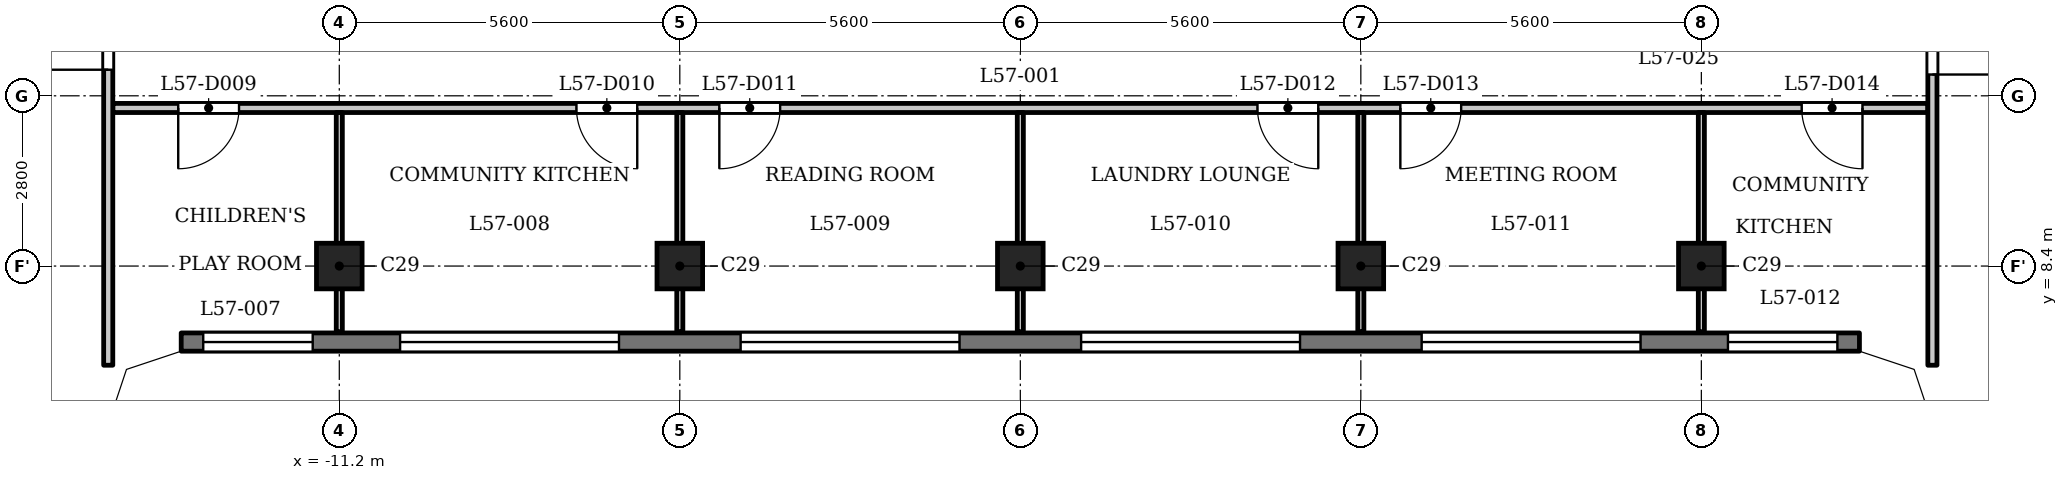
"""IFC4 building model, lengths in metres.
Left out: names, types, materials, properties, quantities, classifications, styles, units other than length and angle.
Written with IfcOpenShell. Run it as: python <this file> out.ifc"""

import sys

from ifc_helpers import new_model, si_unit, direction, frame, frame_2d, origin, origin_2d, place, context, subcontext, project, spatial, polyline, rectangle, outline, extrude, element, fill, save


model = new_model("IFC4")
c1 = context("Model", 3, precision=1e-05, world=origin(), true_north=direction((0.0, 1.0)))
c2 = subcontext(c1, "Body", "Model", "MODEL_VIEW")
j1 = project(units=[si_unit("LENGTHUNIT", "METRE"), si_unit("PLANEANGLEUNIT", "RADIAN")], contexts=[c1])
p1 = place(None, origin())
s1 = spatial("IfcSite", under=j1, at=p1, CompositionType="ELEMENT")
p2 = place(p1, origin())
s2 = spatial("IfcBuilding", under=s1, at=p2, CompositionType="ELEMENT")
p3 = place(p2, frame((0.0, 0.0, 220.4)))
s3 = spatial("IfcBuildingStorey", under=s2, at=p3, CompositionType="ELEMENT", Elevation=220.4)
for number, where, z_axis, x_axis in (
    (1, (-11.2, 8.4, 0.0), (0.0, 0.0, 1.0), (1.0, 0.0, 0.0)),
    (2, (-5.6, 8.4, 0.0), (0.0, 0.0, 1.0), (1.0, 0.0, 0.0)),
    (3, (0.0, 8.4, 0.0), (0.0, 0.0, 1.0), (1.0, 0.0, 0.0)),
    (4, (5.6, 8.4, 0.0), (0.0, 0.0, 1.0), (1.0, 0.0, 0.0)),
    (5, (11.2, 8.4, 0.0), (0.0, 0.0, 1.0), (1.0, 0.0, 0.0)),
):
    element("IfcColumn", number, at=place(p3, frame(where, z_axis=z_axis, x_axis=x_axis)), inside=s3, PredefinedType="COLUMN", context=c2, shape_type="SweptSolid", body=[
        extrude(rectangle(XDim=0.75, YDim=0.75, at=origin_2d()), origin(), (0.0, 0.0, 1.0), 3.5),
    ])
p4 = place(p3, frame((-13.8, 7.15, 0.0), z_axis=(0.0, 0.0, 1.0), x_axis=(1.0, 0.0, 0.0)))
e6 = element("IfcWall", 6, at=p4, inside=s3, PredefinedType="SOLIDWALL", context=c2, shape_type="SweptSolid", body=[
    extrude(rectangle(XDim=27.6, YDim=0.3, at=frame_2d((13.8, 0.0))), origin(), (0.0, 0.0, 1.0), 3.2),
])
p5 = place(p4, frame((0.363, 0.0, 0.9)))
e7 = element("IfcOpeningElement", 7, at=p5, cuts=e6, PredefinedType="OPENING", context=c2, shape_type="SweptSolid", body=[
    extrude(rectangle(XDim=1.8, YDim=1.25, at=frame_2d((0.9, 0.625))), frame((0.0, 0.16, 0.0), z_axis=(0.0, -1.0, 0.0), x_axis=(1.0, 0.0, 0.0)), (0.0, 0.0, 1.0), 0.32),
])
p6 = place(p4, frame((3.6, 0.0, 1.2)))
e8 = element("IfcOpeningElement", 8, at=p6, cuts=e6, PredefinedType="OPENING", context=c2, shape_type="SweptSolid", body=[
    extrude(rectangle(XDim=3.6, YDim=0.95, at=frame_2d((1.8, 0.475))), frame((0.0, 0.16, 0.0), z_axis=(0.0, -1.0, 0.0), x_axis=(1.0, 0.0, 0.0)), (0.0, 0.0, 1.0), 0.32),
])
p7 = place(p4, frame((9.2, 0.0, 1.2)))
e9 = element("IfcOpeningElement", 9, at=p7, cuts=e6, PredefinedType="OPENING", context=c2, shape_type="SweptSolid", body=[
    extrude(rectangle(XDim=3.6, YDim=0.95, at=frame_2d((1.8, 0.475))), frame((0.0, 0.16, 0.0), z_axis=(0.0, -1.0, 0.0), x_axis=(1.0, 0.0, 0.0)), (0.0, 0.0, 1.0), 0.32),
])
p8 = place(p4, frame((14.8, 0.0, 1.2)))
e10 = element("IfcOpeningElement", 10, at=p8, cuts=e6, PredefinedType="OPENING", context=c2, shape_type="SweptSolid", body=[
    extrude(rectangle(XDim=3.6, YDim=0.95, at=frame_2d((1.8, 0.475))), frame((0.0, 0.16, 0.0), z_axis=(0.0, -1.0, 0.0), x_axis=(1.0, 0.0, 0.0)), (0.0, 0.0, 1.0), 0.32),
])
p9 = place(p4, frame((20.4, 0.0, 1.2)))
e11 = element("IfcOpeningElement", 11, at=p9, cuts=e6, PredefinedType="OPENING", context=c2, shape_type="SweptSolid", body=[
    extrude(rectangle(XDim=3.6, YDim=0.95, at=frame_2d((1.8, 0.475))), frame((0.0, 0.16, 0.0), z_axis=(0.0, -1.0, 0.0), x_axis=(1.0, 0.0, 0.0)), (0.0, 0.0, 1.0), 0.32),
])
p10 = place(p4, frame((25.438, 0.0, 0.9)))
e12 = element("IfcOpeningElement", 12, at=p10, cuts=e6, PredefinedType="OPENING", context=c2, shape_type="SweptSolid", body=[
    extrude(rectangle(XDim=1.8, YDim=1.25, at=frame_2d((0.9, 0.625))), frame((0.0, 0.16, 0.0), z_axis=(0.0, -1.0, 0.0), x_axis=(1.0, 0.0, 0.0)), (0.0, 0.0, 1.0), 0.32),
])
p11 = place(p3, frame((-14.925, 11.0, 0.0), z_axis=(0.0, 0.0, 1.0), x_axis=(1.0, 0.0, 0.0)))
e13 = element("IfcWall", 13, at=p11, inside=s3, PredefinedType="PARTITIONING", context=c2, shape_type="SweptSolid", body=[
    extrude(rectangle(XDim=29.85, YDim=0.15, at=frame_2d((14.925, 0.0))), origin(), (0.0, 0.0, 1.0), 3.2),
])
p12 = place(p11, frame((1.076, 0.0, 0.0)))
e14 = element("IfcOpeningElement", 14, at=p12, cuts=e13, PredefinedType="OPENING", context=c2, shape_type="SweptSolid", body=[
    extrude(rectangle(XDim=1.0, YDim=2.1, at=frame_2d((0.5, 1.05))), frame((0.0, 0.085, 0.0), z_axis=(0.0, -1.0, 0.0), x_axis=(1.0, 0.0, 0.0)), (0.0, 0.0, 1.0), 0.17),
])
p13 = place(p11, frame((7.625, 0.0, 0.0)))
e15 = element("IfcOpeningElement", 15, at=p13, cuts=e13, PredefinedType="OPENING", context=c2, shape_type="SweptSolid", body=[
    extrude(rectangle(XDim=1.0, YDim=2.1, at=frame_2d((0.5, 1.05))), frame((0.0, 0.085, 0.0), z_axis=(0.0, -1.0, 0.0), x_axis=(1.0, 0.0, 0.0)), (0.0, 0.0, 1.0), 0.17),
])
p14 = place(p11, frame((9.975, 0.0, 0.0)))
e16 = element("IfcOpeningElement", 16, at=p14, cuts=e13, PredefinedType="OPENING", context=c2, shape_type="SweptSolid", body=[
    extrude(rectangle(XDim=1.0, YDim=2.1, at=frame_2d((0.5, 1.05))), frame((0.0, 0.085, 0.0), z_axis=(0.0, -1.0, 0.0), x_axis=(1.0, 0.0, 0.0)), (0.0, 0.0, 1.0), 0.17),
])
p15 = place(p11, frame((18.825, 0.0, 0.0)))
e17 = element("IfcOpeningElement", 17, at=p15, cuts=e13, PredefinedType="OPENING", context=c2, shape_type="SweptSolid", body=[
    extrude(rectangle(XDim=1.0, YDim=2.1, at=frame_2d((0.5, 1.05))), frame((0.0, 0.085, 0.0), z_axis=(0.0, -1.0, 0.0), x_axis=(1.0, 0.0, 0.0)), (0.0, 0.0, 1.0), 0.17),
])
p16 = place(p11, frame((21.175, 0.0, 0.0)))
e18 = element("IfcOpeningElement", 18, at=p16, cuts=e13, PredefinedType="OPENING", context=c2, shape_type="SweptSolid", body=[
    extrude(rectangle(XDim=1.0, YDim=2.1, at=frame_2d((0.5, 1.05))), frame((0.0, 0.085, 0.0), z_axis=(0.0, -1.0, 0.0), x_axis=(1.0, 0.0, 0.0)), (0.0, 0.0, 1.0), 0.17),
])
p17 = place(p11, frame((27.775, 0.0, 0.0)))
e19 = element("IfcOpeningElement", 19, at=p17, cuts=e13, PredefinedType="OPENING", context=c2, shape_type="SweptSolid", body=[
    extrude(rectangle(XDim=1.0, YDim=2.1, at=frame_2d((0.5, 1.05))), frame((0.0, 0.085, 0.0), z_axis=(0.0, -1.0, 0.0), x_axis=(1.0, 0.0, 0.0)), (0.0, 0.0, 1.0), 0.17),
])
p18 = place(p3, frame((-15.0, 6.769, 0.0), z_axis=(0.0, 0.0, 1.0), x_axis=(0.0, 1.0, 0.0)))
e20 = element("IfcWall", 20, at=p18, inside=s3, PredefinedType="PARTITIONING", context=c2, shape_type="SweptSolid", body=[
    extrude(rectangle(XDim=6.356, YDim=0.15, at=frame_2d((3.178, 0.0))), origin(), (0.0, 0.0, 1.0), 3.2),
])
p19 = place(p18, frame((4.86, 0.0, 0.0)))
e21 = element("IfcOpeningElement", 21, at=p19, cuts=e20, PredefinedType="OPENING", context=c2, shape_type="SweptSolid", body=[
    extrude(rectangle(XDim=1.0, YDim=2.1, at=frame_2d((0.5, 1.05))), frame((0.0, 0.085, 0.0), z_axis=(0.0, -1.0, 0.0), x_axis=(1.0, 0.0, 0.0)), (0.0, 0.0, 1.0), 0.17),
])
for number, where, z_axis, x_axis in (
    (22, (-11.2, 7.32, 0.0), (0.0, 0.0, 1.0), (0.0, 1.0, 0.0)),
    (23, (-5.6, 7.32, 0.0), (0.0, 0.0, 1.0), (0.0, 1.0, 0.0)),
    (24, (0.0, 7.32, 0.0), (0.0, 0.0, 1.0), (0.0, 1.0, 0.0)),
    (25, (5.6, 7.32, 0.0), (0.0, 0.0, 1.0), (0.0, 1.0, 0.0)),
    (26, (11.2, 7.32, 0.0), (0.0, 0.0, 1.0), (0.0, 1.0, 0.0)),
):
    element("IfcWall", number, at=place(p3, frame(where, z_axis=z_axis, x_axis=x_axis)), inside=s3, PredefinedType="PARTITIONING", context=c2, shape_type="SweptSolid", body=[
        extrude(rectangle(XDim=3.605, YDim=0.1, at=frame_2d((1.802, 0.0))), origin(), (0.0, 0.0, 1.0), 3.2),
    ])
p20 = place(p3, frame((15.0, 6.769, 0.0), z_axis=(0.0, 0.0, 1.0), x_axis=(0.0, 1.0, 0.0)))
e27 = element("IfcWall", 27, at=p20, inside=s3, PredefinedType="PARTITIONING", context=c2, shape_type="SweptSolid", body=[
    extrude(rectangle(XDim=6.356, YDim=0.15, at=frame_2d((3.178, 0.0))), origin(), (0.0, 0.0, 1.0), 3.2),
])
p21 = place(p20, frame((4.781, 0.0, 0.0)))
e28 = element("IfcOpeningElement", 28, at=p21, cuts=e27, PredefinedType="OPENING", context=c2, shape_type="SweptSolid", body=[
    extrude(rectangle(XDim=1.0, YDim=2.1, at=frame_2d((0.5, 1.05))), frame((0.0, 0.085, 0.0), z_axis=(0.0, -1.0, 0.0), x_axis=(1.0, 0.0, 0.0)), (0.0, 0.0, 1.0), 0.17),
])
p22 = place(p3, origin())
e29 = element("IfcWall", 29, at=p22, inside=s3, PredefinedType="SOLIDWALL", context=c2, shape_type="SweptSolid", body=[
    extrude(outline(polyline([(-13.849, 7.3), (-14.937, 6.937), (-15.3, 5.849), (-15.3, 5.8), (-15.0, 5.8), (-14.7, 6.7), (-13.8, 7.0), (-13.8, 7.3), (-13.849, 7.3)])), origin(), (0.0, 0.0, 1.0), 3.2),
])
e30 = element("IfcWall", 30, at=p22, inside=s3, PredefinedType="SOLIDWALL", context=c2, shape_type="SweptSolid", body=[
    extrude(outline(polyline([(14.937, 6.937), (13.849, 7.3), (13.8, 7.3), (13.8, 7.0), (14.7, 6.7), (15.0, 5.8), (15.3, 5.8), (15.3, 5.849), (14.937, 6.937)])), origin(), (0.0, 0.0, 1.0), 3.2),
])
p23 = place(p19, origin())
e31 = element("IfcDoor", 31, at=p23, inside=s3, OperationType="SINGLE_SWING_RIGHT", PredefinedType="DOOR", context=c2, shape_type="SweptSolid", body=[
    extrude(rectangle(XDim=1.0, YDim=2.1, at=frame_2d((0.5, 1.05))), frame((0.0, 0.025, 0.0), z_axis=(0.0, -1.0, 0.0), x_axis=(1.0, 0.0, 0.0)), (0.0, 0.0, 1.0), 0.05),
])
fill(e21, e31)
p24 = place(p21, origin())
e32 = element("IfcDoor", 32, at=p24, inside=s3, OperationType="SINGLE_SWING_LEFT", PredefinedType="DOOR", context=c2, shape_type="SweptSolid", body=[
    extrude(rectangle(XDim=1.0, YDim=2.1, at=frame_2d((0.5, 1.05))), frame((0.0, 0.025, 0.0), z_axis=(0.0, -1.0, 0.0), x_axis=(1.0, 0.0, 0.0)), (0.0, 0.0, 1.0), 0.05),
])
fill(e28, e32)
p25 = place(p12, origin())
e33 = element("IfcDoor", 33, at=p25, inside=s3, OperationType="SINGLE_SWING_LEFT", PredefinedType="DOOR", context=c2, shape_type="SweptSolid", body=[
    extrude(rectangle(XDim=1.0, YDim=2.1, at=frame_2d((0.5, 1.05))), frame((0.0, 0.025, 0.0), z_axis=(0.0, -1.0, 0.0), x_axis=(1.0, 0.0, 0.0)), (0.0, 0.0, 1.0), 0.05),
])
fill(e14, e33)
p26 = place(p13, origin())
e34 = element("IfcDoor", 34, at=p26, inside=s3, OperationType="SINGLE_SWING_RIGHT", PredefinedType="DOOR", context=c2, shape_type="SweptSolid", body=[
    extrude(rectangle(XDim=1.0, YDim=2.1, at=frame_2d((0.5, 1.05))), frame((0.0, 0.025, 0.0), z_axis=(0.0, -1.0, 0.0), x_axis=(1.0, 0.0, 0.0)), (0.0, 0.0, 1.0), 0.05),
])
fill(e15, e34)
p27 = place(p14, origin())
e35 = element("IfcDoor", 35, at=p27, inside=s3, OperationType="SINGLE_SWING_LEFT", PredefinedType="DOOR", context=c2, shape_type="SweptSolid", body=[
    extrude(rectangle(XDim=1.0, YDim=2.1, at=frame_2d((0.5, 1.05))), frame((0.0, 0.025, 0.0), z_axis=(0.0, -1.0, 0.0), x_axis=(1.0, 0.0, 0.0)), (0.0, 0.0, 1.0), 0.05),
])
fill(e16, e35)
p28 = place(p15, origin())
e36 = element("IfcDoor", 36, at=p28, inside=s3, OperationType="SINGLE_SWING_RIGHT", PredefinedType="DOOR", context=c2, shape_type="SweptSolid", body=[
    extrude(rectangle(XDim=1.0, YDim=2.1, at=frame_2d((0.5, 1.05))), frame((0.0, 0.025, 0.0), z_axis=(0.0, -1.0, 0.0), x_axis=(1.0, 0.0, 0.0)), (0.0, 0.0, 1.0), 0.05),
])
fill(e17, e36)
p29 = place(p16, origin())
e37 = element("IfcDoor", 37, at=p29, inside=s3, OperationType="SINGLE_SWING_LEFT", PredefinedType="DOOR", context=c2, shape_type="SweptSolid", body=[
    extrude(rectangle(XDim=1.0, YDim=2.1, at=frame_2d((0.5, 1.05))), frame((0.0, 0.025, 0.0), z_axis=(0.0, -1.0, 0.0), x_axis=(1.0, 0.0, 0.0)), (0.0, 0.0, 1.0), 0.05),
])
fill(e18, e37)
p30 = place(p17, origin())
e38 = element("IfcDoor", 38, at=p30, inside=s3, OperationType="SINGLE_SWING_RIGHT", PredefinedType="DOOR", context=c2, shape_type="SweptSolid", body=[
    extrude(rectangle(XDim=1.0, YDim=2.1, at=frame_2d((0.5, 1.05))), frame((0.0, 0.025, 0.0), z_axis=(0.0, -1.0, 0.0), x_axis=(1.0, 0.0, 0.0)), (0.0, 0.0, 1.0), 0.05),
])
fill(e19, e38)
p31 = place(p5, origin())
e39 = element("IfcWindow", 39, at=p31, inside=s3, PartitioningType="SINGLE_PANEL", PredefinedType="WINDOW", context=c2, shape_type="SweptSolid", body=[
    extrude(rectangle(XDim=1.8, YDim=1.25, at=frame_2d((0.9, 0.625))), frame((0.0, 0.03, 0.0), z_axis=(0.0, -1.0, 0.0), x_axis=(1.0, 0.0, 0.0)), (0.0, 0.0, 1.0), 0.06),
])
fill(e7, e39)
p32 = place(p6, origin())
e40 = element("IfcWindow", 40, at=p32, inside=s3, PartitioningType="SINGLE_PANEL", PredefinedType="WINDOW", context=c2, shape_type="SweptSolid", body=[
    extrude(rectangle(XDim=3.6, YDim=0.95, at=frame_2d((1.8, 0.475))), frame((0.0, 0.03, 0.0), z_axis=(0.0, -1.0, 0.0), x_axis=(1.0, 0.0, 0.0)), (0.0, 0.0, 1.0), 0.06),
])
fill(e8, e40)
p33 = place(p7, origin())
e41 = element("IfcWindow", 41, at=p33, inside=s3, PartitioningType="SINGLE_PANEL", PredefinedType="WINDOW", context=c2, shape_type="SweptSolid", body=[
    extrude(rectangle(XDim=3.6, YDim=0.95, at=frame_2d((1.8, 0.475))), frame((0.0, 0.03, 0.0), z_axis=(0.0, -1.0, 0.0), x_axis=(1.0, 0.0, 0.0)), (0.0, 0.0, 1.0), 0.06),
])
fill(e9, e41)
p34 = place(p8, origin())
e42 = element("IfcWindow", 42, at=p34, inside=s3, PartitioningType="SINGLE_PANEL", PredefinedType="WINDOW", context=c2, shape_type="SweptSolid", body=[
    extrude(rectangle(XDim=3.6, YDim=0.95, at=frame_2d((1.8, 0.475))), frame((0.0, 0.03, 0.0), z_axis=(0.0, -1.0, 0.0), x_axis=(1.0, 0.0, 0.0)), (0.0, 0.0, 1.0), 0.06),
])
fill(e10, e42)
p35 = place(p9, origin())
e43 = element("IfcWindow", 43, at=p35, inside=s3, PartitioningType="SINGLE_PANEL", PredefinedType="WINDOW", context=c2, shape_type="SweptSolid", body=[
    extrude(rectangle(XDim=3.6, YDim=0.95, at=frame_2d((1.8, 0.475))), frame((0.0, 0.03, 0.0), z_axis=(0.0, -1.0, 0.0), x_axis=(1.0, 0.0, 0.0)), (0.0, 0.0, 1.0), 0.06),
])
fill(e11, e43)
p36 = place(p10, origin())
e44 = element("IfcWindow", 44, at=p36, inside=s3, PartitioningType="SINGLE_PANEL", PredefinedType="WINDOW", context=c2, shape_type="SweptSolid", body=[
    extrude(rectangle(XDim=1.8, YDim=1.25, at=frame_2d((0.9, 0.625))), frame((0.0, 0.03, 0.0), z_axis=(0.0, -1.0, 0.0), x_axis=(1.0, 0.0, 0.0)), (0.0, 0.0, 1.0), 0.06),
])
fill(e12, e44)
save(model, sys.argv[1])
